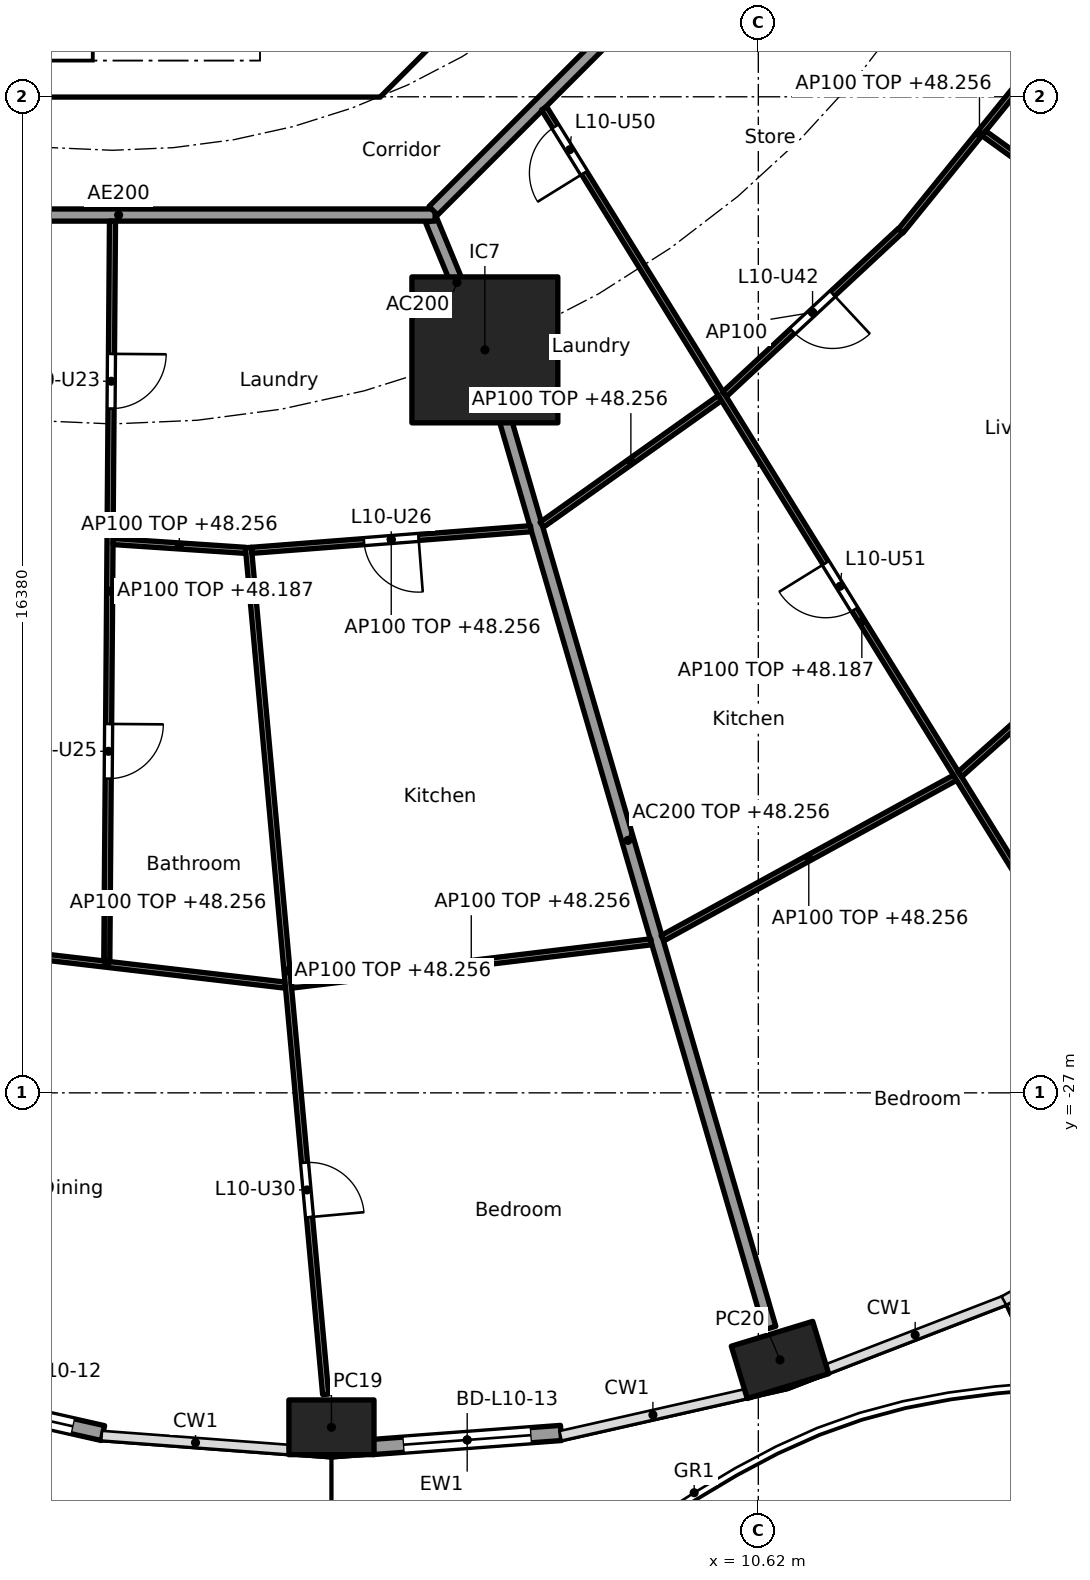
"""IFC4 building model, lengths in metres.
Left out: names, types, materials, properties, quantities, classifications, styles, units other than length and angle.
Written with IfcOpenShell. Run it as: python <this file> out.ifc"""

import sys

from ifc_helpers import new_model, si_unit, direction, frame, frame_2d, origin, origin_2d, place, context, subcontext, project, spatial, polyline, rectangle, hollow_rectangle, outline, extrude, element, fill, save


model = new_model("IFC4")
c1 = context("Model", 3, precision=1e-05, world=origin(), true_north=direction((0.0, 1.0)))
c2 = subcontext(c1, "Body", "Model", "MODEL_VIEW")
j1 = project(units=[si_unit("LENGTHUNIT", "METRE"), si_unit("PLANEANGLEUNIT", "RADIAN")], contexts=[c1])
p1 = place(None, origin())
s1 = spatial("IfcSite", under=j1, at=p1, CompositionType="ELEMENT")
p2 = place(p1, origin())
s2 = spatial("IfcBuilding", under=s1, at=p2, CompositionType="ELEMENT")
p3 = place(p2, frame((0.0, 0.0, 45.5)))
s3 = spatial("IfcBuildingStorey", under=s2, at=p3, CompositionType="ELEMENT", Elevation=45.5)
for number, where, z_axis, x_axis in (
    (1, (3.6, -32.5, 0.0), (0.0, 0.0, 1.0), (1.0, 0.0, 0.0)),
    (2, (10.976, -31.393, 0.0), (0.0, 0.0, 1.0), (0.957, 0.292, 0.0)),
):
    element("IfcColumn", number, at=place(p3, frame(where, z_axis=z_axis, x_axis=x_axis)), inside=s3, PredefinedType="COLUMN", context=c2, shape_type="SweptSolid", body=[
        extrude(hollow_rectangle(XDim=1.4, YDim=0.9, WallThickness=0.05, at=origin_2d()), origin(), (0.0, 0.0, 1.0), 3.7),
    ])
p4 = place(p3, frame((6.123, -14.782, 0.0), z_axis=(0.0, 0.0, 1.0), x_axis=(1.0, 0.0, 0.0)))
e3 = element("IfcColumn", 3, at=p4, inside=s3, PredefinedType="COLUMN", context=c2, shape_type="SweptSolid", body=[
    extrude(rectangle(XDim=2.4, YDim=2.4, at=origin_2d()), origin(), (0.0, 0.0, 1.0), 3.7),
])
p5 = place(p3, frame((-0.158, -32.596, 0.0), z_axis=(0.0, 0.0, 1.0), x_axis=(-0.975331134677, 0.220746863466, 0.0)))
e4 = element("IfcWall", 4, at=p5, inside=s3, PredefinedType="SOLIDWALL", context=c2, shape_type="SweptSolid", body=[
    extrude(rectangle(XDim=3.115, YDim=0.25, at=frame_2d((1.557, 0.0))), origin(), (0.0, 0.0, 1.0), 3.44),
])
p6 = place(p5, frame((0.507, 0.0, 0.0)))
e5 = element("IfcOpeningElement", 5, at=p6, cuts=e4, PredefinedType="OPENING", context=c2, shape_type="SweptSolid", body=[
    extrude(rectangle(XDim=2.1, YDim=2.4, at=frame_2d((1.05, 1.2))), frame((0.0, 0.135, 0.0), z_axis=(0.0, -1.0, 0.0), x_axis=(1.0, 0.0, 0.0)), (0.0, 0.0, 1.0), 0.27),
])
p7 = place(p3, frame((7.376, -32.593, 0.0), z_axis=(0.0, 0.0, 1.0), x_axis=(-0.997230834878, -0.074368420505, 0.0)))
e6 = element("IfcWall", 6, at=p7, inside=s3, PredefinedType="SOLIDWALL", context=c2, shape_type="SweptSolid", body=[
    extrude(rectangle(XDim=3.096, YDim=0.25, at=frame_2d((1.548, 0.0))), origin(), (0.0, 0.0, 1.0), 3.44),
])
p8 = place(p7, frame((0.498, 0.0, 0.0)))
e7 = element("IfcOpeningElement", 7, at=p8, cuts=e6, PredefinedType="OPENING", context=c2, shape_type="SweptSolid", body=[
    extrude(rectangle(XDim=2.1, YDim=2.4, at=frame_2d((1.05, 1.2))), frame((0.0, 0.135, 0.0), z_axis=(0.0, -1.0, 0.0), x_axis=(1.0, 0.0, 0.0)), (0.0, 0.0, 1.0), 0.27),
])
p9 = place(p3, frame((4.613, -9.988, 0.0), z_axis=(0.0, 0.0, 1.0), x_axis=(0.707106781187, 0.707106781187, 0.0)))
e8 = element("IfcWall", 8, at=p9, inside=s3, PredefinedType="SHEAR", context=c2, shape_type="SweptSolid", body=[
    extrude(rectangle(XDim=7.602, YDim=0.6, at=frame_2d((3.801, 0.0))), origin(), (0.0, 0.0, 1.0), 3.44),
])
p10 = place(p9, frame((3.201, 0.0, 0.0)))
e9 = element("IfcOpeningElement", 9, at=p10, cuts=e8, PredefinedType="OPENING", context=c2, shape_type="SweptSolid", body=[
    extrude(rectangle(XDim=1.2, YDim=2.1, at=frame_2d((0.6, 1.05))), frame((0.0, 0.31, 0.0), z_axis=(0.0, -1.0, 0.0), x_axis=(1.0, 0.0, 0.0)), (0.0, 0.0, 1.0), 0.62),
])
p11 = place(p3, frame((4.0, -10.025, 0.0), z_axis=(0.0, 0.0, 1.0), x_axis=(0.0, 1.0, 0.0)))
e10 = element("IfcWall", 10, at=p11, inside=s3, PredefinedType="SOLIDWALL", context=c2, shape_type="SweptSolid", body=[
    extrude(rectangle(XDim=3.0, YDim=0.2, at=frame_2d((1.5, 0.0))), origin(), (0.0, 0.0, 1.0), 3.44),
])
p12 = place(p11, frame((0.975, 0.0, 0.0)))
e11 = element("IfcOpeningElement", 11, at=p12, cuts=e10, PredefinedType="OPENING", context=c2, shape_type="SweptSolid", body=[
    extrude(rectangle(XDim=1.1, YDim=2.1, at=frame_2d((0.55, 1.05))), frame((0.0, 0.11, 0.0), z_axis=(0.0, -1.0, 0.0), x_axis=(1.0, 0.0, 0.0)), (0.0, 0.0, 1.0), 0.22),
])
p13 = place(p3, origin())
e12 = element("IfcWall", 12, at=p13, inside=s3, PredefinedType="SHEAR", context=c2, shape_type="SweptSolid", body=[
    extrude(outline(polyline([(-4.152, -10.025), (4.152, -10.025), (4.401, -9.776), (4.825, -10.2), (4.401, -10.625), (-4.401, -10.625), (-4.825, -10.2), (-4.401, -9.776), (-4.152, -10.025)])), origin(), (0.0, 0.0, 1.0), 3.44),
])
p14 = place(p3, frame((5.243, -12.657, 0.0), z_axis=(0.0, 0.0, 1.0), x_axis=(0.382707856524, -0.923869415315, 0.0)))
e13 = element("IfcWall", 13, at=p14, inside=s3, PredefinedType="PARTITIONING", context=c2, shape_type="SweptSolid", body=[
    extrude(rectangle(XDim=2.2, YDim=0.2, at=frame_2d((1.1, 0.0))), origin(), (0.0, 0.0, 1.0), 3.44),
])
p15 = place(p3, frame((6.137, -14.83, 0.0), z_axis=(0.0, 0.0, 1.0), x_axis=(0.27985745069, -0.960041565399, 0.0)))
e14 = element("IfcWall", 14, at=p15, inside=s3, PredefinedType="PARTITIONING", context=c2, shape_type="SweptSolid", body=[
    extrude(rectangle(XDim=16.705, YDim=0.2, at=frame_2d((8.353, 0.0))), origin(), (0.0, 0.0, 1.0), 2.756),
])
p16 = place(p3, frame((-5.104, -12.565, 0.0), z_axis=(0.0, 0.0, 1.0), x_axis=(1.0, 0.0, 0.0)))
e15 = element("IfcWall", 15, at=p16, inside=s3, PredefinedType="PARTITIONING", context=c2, shape_type="SweptSolid", body=[
    extrude(rectangle(XDim=10.409, YDim=0.2, at=frame_2d((5.205, 0.0))), origin(), (0.0, 0.0, 1.0), 3.44),
])
p17 = place(p16, frame((2.87, 0.0, 0.0)))
e16 = element("IfcOpeningElement", 16, at=p17, cuts=e15, PredefinedType="OPENING", context=c2, shape_type="SweptSolid", body=[
    extrude(rectangle(XDim=1.0, YDim=2.1, at=frame_2d((0.5, 1.05))), frame((0.0, 0.11, 0.0), z_axis=(0.0, -1.0, 0.0), x_axis=(1.0, 0.0, 0.0)), (0.0, 0.0, 1.0), 0.22),
])
p18 = place(p3, frame((5.275, -12.494, 0.0), z_axis=(0.0, 0.0, 1.0), x_axis=(0.707106781187, 0.707106781187, 0.0)))
e17 = element("IfcWall", 17, at=p18, inside=s3, PredefinedType="PARTITIONING", context=c2, shape_type="SweptSolid", body=[
    extrude(rectangle(XDim=10.409, YDim=0.2, at=frame_2d((5.205, 0.0))), origin(), (0.0, 0.0, 1.0), 3.44),
])
p19 = place(p18, frame((8.508, 0.0, 0.0)))
e18 = element("IfcOpeningElement", 18, at=p19, cuts=e17, PredefinedType="OPENING", context=c2, shape_type="SweptSolid", body=[
    extrude(rectangle(XDim=1.0, YDim=2.1, at=frame_2d((0.5, 1.05))), frame((0.0, 0.11, 0.0), z_axis=(0.0, -1.0, 0.0), x_axis=(1.0, 0.0, 0.0)), (0.0, 0.0, 1.0), 0.22),
])
p20 = place(p3, frame((-3.031, -24.543, 0.0), z_axis=(0.0, 0.0, 1.0), x_axis=(0.993255612046, -0.115945198862, 0.0)))
e19 = element("IfcWall", 19, at=p20, inside=s3, PredefinedType="PARTITIONING", context=c2, shape_type="SweptSolid", body=[
    extrude(rectangle(XDim=5.913, YDim=0.1, at=frame_2d((2.956, 0.0))), origin(), (0.0, 0.0, 1.0), 2.756),
])
p21 = place(p3, frame((-0.001, -12.665, 0.0), z_axis=(0.0, 0.0, 1.0), x_axis=(-0.007702417287, -0.999970335944, 0.0)))
e20 = element("IfcWall", 20, at=p21, inside=s3, PredefinedType="PARTITIONING", context=c2, shape_type="SweptSolid", body=[
    extrude(rectangle(XDim=12.171, YDim=0.1, at=frame_2d((6.086, 0.0))), origin(), (0.0, 0.0, 1.0), 2.687),
])
p22 = place(p21, frame((2.183, 0.0, 0.0)))
e21 = element("IfcOpeningElement", 21, at=p22, cuts=e20, PredefinedType="OPENING", context=c2, shape_type="SweptSolid", body=[
    extrude(rectangle(XDim=0.9, YDim=2.1, at=frame_2d((0.45, 1.05))), frame((0.0, 0.06, 0.0), z_axis=(0.0, -1.0, 0.0), x_axis=(1.0, 0.0, 0.0)), (0.0, 0.0, 1.0), 0.12),
])
p23 = place(p21, frame((8.269, 0.0, 0.0)))
e22 = element("IfcOpeningElement", 22, at=p23, cuts=e20, PredefinedType="OPENING", context=c2, shape_type="SweptSolid", body=[
    extrude(rectangle(XDim=0.9, YDim=2.1, at=frame_2d((0.45, 1.05))), frame((0.0, 0.06, 0.0), z_axis=(0.0, -1.0, 0.0), x_axis=(1.0, 0.0, 0.0)), (0.0, 0.0, 1.0), 0.12),
])
p24 = place(p3, frame((0.009, -17.934, 0.0), z_axis=(0.0, 0.0, 1.0), x_axis=(0.997794542617, -0.066378089183, 0.0)))
e23 = element("IfcWall", 23, at=p24, inside=s3, PredefinedType="PARTITIONING", context=c2, shape_type="SweptSolid", body=[
    extrude(rectangle(XDim=2.185, YDim=0.1, at=frame_2d((1.092, 0.0))), origin(), (0.0, 0.0, 1.0), 2.756),
])
p25 = place(p3, frame((2.234, -18.032, 0.0), z_axis=(0.0, 0.0, 1.0), x_axis=(0.090891502968, -0.995860800859, 0.0)))
e24 = element("IfcWall", 24, at=p25, inside=s3, PredefinedType="PARTITIONING", context=c2, shape_type="SweptSolid", body=[
    extrude(rectangle(XDim=13.984, YDim=0.1, at=frame_2d((6.992, 0.0))), origin(), (0.0, 0.0, 1.0), 2.756),
])
p26 = place(p25, frame((10.158, 0.0, 0.0)))
e25 = element("IfcOpeningElement", 25, at=p26, cuts=e24, PredefinedType="OPENING", context=c2, shape_type="SweptSolid", body=[
    extrude(rectangle(XDim=0.9, YDim=2.1, at=frame_2d((0.45, 1.05))), frame((0.0, 0.06, 0.0), z_axis=(0.0, -1.0, 0.0), x_axis=(1.0, 0.0, 0.0)), (0.0, 0.0, 1.0), 0.12),
])
p27 = place(p3, frame((2.288, -18.078, 0.0), z_axis=(0.0, 0.0, 1.0), x_axis=(0.99701850123, 0.077162868047, 0.0)))
e26 = element("IfcWall", 26, at=p27, inside=s3, PredefinedType="PARTITIONING", context=c2, shape_type="SweptSolid", body=[
    extrude(rectangle(XDim=4.604, YDim=0.1, at=frame_2d((2.302, 0.0))), origin(), (0.0, 0.0, 1.0), 2.756),
])
p28 = place(p27, frame((1.852, 0.0, 0.0)))
e27 = element("IfcOpeningElement", 27, at=p28, cuts=e26, PredefinedType="OPENING", context=c2, shape_type="SweptSolid", body=[
    extrude(rectangle(XDim=0.9, YDim=2.1, at=frame_2d((0.45, 1.05))), frame((0.0, 0.06, 0.0), z_axis=(0.0, -1.0, 0.0), x_axis=(1.0, 0.0, 0.0)), (0.0, 0.0, 1.0), 0.12),
])
p29 = place(p3, frame((2.941, -25.229, 0.0), z_axis=(0.0, 0.0, 1.0), x_axis=(0.992834127896, 0.119500604542, 0.0)))
e28 = element("IfcWall", 28, at=p29, inside=s3, PredefinedType="PARTITIONING", context=c2, shape_type="SweptSolid", body=[
    extrude(rectangle(XDim=5.959, YDim=0.1, at=frame_2d((2.98, 0.0))), origin(), (0.0, 0.0, 1.0), 2.756),
])
p30 = place(p3, frame((7.06, -17.657, 0.0), z_axis=(0.0, 0.0, 1.0), x_axis=(0.81492039338, 0.57957290521, 0.0)))
e29 = element("IfcWall", 29, at=p30, inside=s3, PredefinedType="PARTITIONING", context=c2, shape_type="SweptSolid", body=[
    extrude(rectangle(XDim=3.594, YDim=0.1, at=frame_2d((1.797, 0.0))), origin(), (0.0, 0.0, 1.0), 2.756),
])
p31 = place(p3, frame((9.045, -24.456, 0.0), z_axis=(0.0, 0.0, 1.0), x_axis=(0.876809987787, 0.480837025734, 0.0)))
e30 = element("IfcWall", 30, at=p31, inside=s3, PredefinedType="PARTITIONING", context=c2, shape_type="SweptSolid", body=[
    extrude(rectangle(XDim=5.486, YDim=0.1, at=frame_2d((2.743, 0.0))), origin(), (0.0, 0.0, 1.0), 2.756),
])
p32 = place(p3, frame((7.097, -10.81, 0.0), z_axis=(0.0, 0.0, 1.0), x_axis=(0.526453266471, -0.850204068576, 0.0)))
e31 = element("IfcWall", 31, at=p32, inside=s3, PredefinedType="PARTITIONING", context=c2, shape_type="SweptSolid", body=[
    extrude(rectangle(XDim=19.85, YDim=0.1, at=frame_2d((9.925, 0.0))), origin(), (0.0, 0.0, 1.0), 2.687),
])
p33 = place(p32, frame((0.35, 0.0, 0.0)))
e32 = element("IfcOpeningElement", 32, at=p33, cuts=e31, PredefinedType="OPENING", context=c2, shape_type="SweptSolid", body=[
    extrude(rectangle(XDim=0.9, YDim=2.1, at=frame_2d((0.45, 1.05))), frame((0.0, 0.06, 0.0), z_axis=(0.0, -1.0, 0.0), x_axis=(1.0, 0.0, 0.0)), (0.0, 0.0, 1.0), 0.12),
])
p34 = place(p32, frame((8.795, 0.0, 0.0)))
e33 = element("IfcOpeningElement", 33, at=p34, cuts=e31, PredefinedType="OPENING", context=c2, shape_type="SweptSolid", body=[
    extrude(rectangle(XDim=0.9, YDim=2.1, at=frame_2d((0.45, 1.05))), frame((0.0, 0.06, 0.0), z_axis=(0.0, -1.0, 0.0), x_axis=(1.0, 0.0, 0.0)), (0.0, 0.0, 1.0), 0.12),
])
p35 = place(p32, frame((15.935, 0.0, 0.0)))
e34 = element("IfcOpeningElement", 34, at=p35, cuts=e31, PredefinedType="OPENING", context=c2, shape_type="SweptSolid", body=[
    extrude(rectangle(XDim=0.9, YDim=2.1, at=frame_2d((0.45, 1.05))), frame((0.0, 0.06, 0.0), z_axis=(0.0, -1.0, 0.0), x_axis=(1.0, 0.0, 0.0)), (0.0, 0.0, 1.0), 0.12),
])
p36 = place(p3, frame((10.066, -15.511, 0.0), z_axis=(0.0, 0.0, 1.0), x_axis=(0.732022571638, 0.681280378855, 0.0)))
e35 = element("IfcWall", 35, at=p36, inside=s3, PredefinedType="PARTITIONING", context=c2, shape_type="SweptSolid", body=[
    extrude(rectangle(XDim=3.95, YDim=0.1, at=frame_2d((1.975, 0.0))), origin(), (0.0, 0.0, 1.0), 3.44),
])
p37 = place(p36, frame((1.525, 0.0, 0.0)))
e36 = element("IfcOpeningElement", 36, at=p37, cuts=e35, PredefinedType="OPENING", context=c2, shape_type="SweptSolid", body=[
    extrude(rectangle(XDim=0.9, YDim=2.1, at=frame_2d((0.45, 1.05))), frame((0.0, 0.06, 0.0), z_axis=(0.0, -1.0, 0.0), x_axis=(1.0, 0.0, 0.0)), (0.0, 0.0, 1.0), 0.12),
])
p38 = place(p3, frame((13.936, -21.761, 0.0), z_axis=(0.0, 0.0, 1.0), x_axis=(0.745806142791, 0.666163041136, 0.0)))
e37 = element("IfcWall", 37, at=p38, inside=s3, PredefinedType="PARTITIONING", context=c2, shape_type="SweptSolid", body=[
    extrude(rectangle(XDim=5.831, YDim=0.1, at=frame_2d((2.915, 0.0))), origin(), (0.0, 0.0, 1.0), 2.756),
])
p39 = place(p38, frame((2.465, 0.0, 0.0)))
e38 = element("IfcOpeningElement", 38, at=p39, cuts=e37, PredefinedType="OPENING", context=c2, shape_type="SweptSolid", body=[
    extrude(rectangle(XDim=0.9, YDim=2.1, at=frame_2d((0.45, 1.05))), frame((0.0, 0.06, 0.0), z_axis=(0.0, -1.0, 0.0), x_axis=(1.0, 0.0, 0.0)), (0.0, 0.0, 1.0), 0.12),
])
p40 = place(p3, frame((12.963, -12.825, 0.0), z_axis=(0.0, 0.0, 1.0), x_axis=(0.63012473344, 0.776493928056, 0.0)))
e39 = element("IfcWall", 39, at=p40, inside=s3, PredefinedType="PARTITIONING", context=c2, shape_type="SweptSolid", body=[
    extrude(rectangle(XDim=4.106, YDim=0.1, at=frame_2d((2.053, 0.0))), origin(), (0.0, 0.0, 1.0), 2.756),
])
p41 = place(p3, frame((14.329, -11.221, 0.0), z_axis=(0.0, 0.0, 1.0), x_axis=(0.810671130917, -0.58550176558, 0.0)))
e40 = element("IfcWall", 40, at=p41, inside=s3, PredefinedType="PARTITIONING", context=c2, shape_type="SweptSolid", body=[
    extrude(rectangle(XDim=15.106, YDim=0.1, at=frame_2d((7.553, 0.0))), origin(), (0.0, 0.0, 1.0), 2.837),
])
p42 = place(p41, frame((10.659, 0.0, 0.0)))
e41 = element("IfcOpeningElement", 41, at=p42, cuts=e40, PredefinedType="OPENING", context=c2, shape_type="SweptSolid", body=[
    extrude(rectangle(XDim=0.9, YDim=2.1, at=frame_2d((0.45, 1.05))), frame((0.0, 0.06, 0.0), z_axis=(0.0, -1.0, 0.0), x_axis=(1.0, 0.0, 0.0)), (0.0, 0.0, 1.0), 0.12),
])
p43 = place(p3, frame((10.813, -7.091, 0.0), z_axis=(0.0, 0.0, 1.0), x_axis=(0.885182649479, -0.465243674928, 0.0)))
e42 = element("IfcWall", 42, at=p43, inside=s3, PredefinedType="PARTITIONING", context=c2, shape_type="SweptSolid", body=[
    extrude(rectangle(XDim=12.551, YDim=0.1, at=frame_2d((6.275, 0.0))), origin(), (0.0, 0.0, 1.0), 2.687),
])
p44 = place(p43, frame((0.539, 0.0, 0.0)))
e43 = element("IfcOpeningElement", 43, at=p44, cuts=e42, PredefinedType="OPENING", context=c2, shape_type="SweptSolid", body=[
    extrude(rectangle(XDim=0.9, YDim=2.1, at=frame_2d((0.45, 1.05))), frame((0.0, 0.06, 0.0), z_axis=(0.0, -1.0, 0.0), x_axis=(1.0, 0.0, 0.0)), (0.0, 0.0, 1.0), 0.12),
])
p45 = place(p43, frame((8.494, 0.0, 0.0)))
e44 = element("IfcOpeningElement", 44, at=p45, cuts=e42, PredefinedType="OPENING", context=c2, shape_type="SweptSolid", body=[
    extrude(rectangle(XDim=0.9, YDim=2.1, at=frame_2d((0.45, 1.05))), frame((0.0, 0.06, 0.0), z_axis=(0.0, -1.0, 0.0), x_axis=(1.0, 0.0, 0.0)), (0.0, 0.0, 1.0), 0.12),
])
p46 = place(p6, origin())
e45 = element("IfcDoor", 45, at=p46, inside=s3, OperationType="SLIDING_TO_LEFT", PredefinedType="DOOR", context=c2, shape_type="SweptSolid", body=[
    extrude(rectangle(XDim=2.1, YDim=2.4, at=frame_2d((1.05, 1.2))), frame((0.0, 0.025, 0.0), z_axis=(0.0, -1.0, 0.0), x_axis=(1.0, 0.0, 0.0)), (0.0, 0.0, 1.0), 0.05),
])
fill(e5, e45)
p47 = place(p8, origin())
e46 = element("IfcDoor", 46, at=p47, inside=s3, OperationType="SLIDING_TO_LEFT", PredefinedType="DOOR", context=c2, shape_type="SweptSolid", body=[
    extrude(rectangle(XDim=2.1, YDim=2.4, at=frame_2d((1.05, 1.2))), frame((0.0, 0.025, 0.0), z_axis=(0.0, -1.0, 0.0), x_axis=(1.0, 0.0, 0.0)), (0.0, 0.0, 1.0), 0.05),
])
fill(e7, e46)
p48 = place(p22, origin())
e47 = element("IfcDoor", 47, at=p48, inside=s3, OperationType="SINGLE_SWING_LEFT", PredefinedType="DOOR", context=c2, shape_type="SweptSolid", body=[
    extrude(rectangle(XDim=0.9, YDim=2.1, at=frame_2d((0.45, 1.05))), frame((0.0, 0.025, 0.0), z_axis=(0.0, -1.0, 0.0), x_axis=(1.0, 0.0, 0.0)), (0.0, 0.0, 1.0), 0.05),
])
fill(e21, e47)
p49 = place(p23, origin())
e48 = element("IfcDoor", 48, at=p49, inside=s3, OperationType="SINGLE_SWING_LEFT", PredefinedType="DOOR", context=c2, shape_type="SweptSolid", body=[
    extrude(rectangle(XDim=0.9, YDim=2.1, at=frame_2d((0.45, 1.05))), frame((0.0, 0.025, 0.0), z_axis=(0.0, -1.0, 0.0), x_axis=(1.0, 0.0, 0.0)), (0.0, 0.0, 1.0), 0.05),
])
fill(e22, e48)
p50 = place(p28, frame((0.9, 0.0, 0.0), x_axis=(-1.0, 0.0, 0.0)))
e49 = element("IfcDoor", 49, at=p50, inside=s3, OperationType="SINGLE_SWING_LEFT", PredefinedType="DOOR", context=c2, shape_type="SweptSolid", body=[
    extrude(rectangle(XDim=0.9, YDim=2.1, at=frame_2d((0.45, 1.05))), frame((0.0, 0.025, 0.0), z_axis=(0.0, -1.0, 0.0), x_axis=(1.0, 0.0, 0.0)), (0.0, 0.0, 1.0), 0.05),
])
fill(e27, e49)
p51 = place(p26, origin())
e50 = element("IfcDoor", 50, at=p51, inside=s3, OperationType="SINGLE_SWING_RIGHT", PredefinedType="DOOR", context=c2, shape_type="SweptSolid", body=[
    extrude(rectangle(XDim=0.9, YDim=2.1, at=frame_2d((0.45, 1.05))), frame((0.0, 0.025, 0.0), z_axis=(0.0, -1.0, 0.0), x_axis=(1.0, 0.0, 0.0)), (0.0, 0.0, 1.0), 0.05),
])
fill(e25, e50)
p52 = place(p37, frame((0.9, 0.0, 0.0), x_axis=(-1.0, 0.0, 0.0)))
e51 = element("IfcDoor", 51, at=p52, inside=s3, OperationType="SINGLE_SWING_LEFT", PredefinedType="DOOR", context=c2, shape_type="SweptSolid", body=[
    extrude(rectangle(XDim=0.9, YDim=2.1, at=frame_2d((0.45, 1.05))), frame((0.0, 0.025, 0.0), z_axis=(0.0, -1.0, 0.0), x_axis=(1.0, 0.0, 0.0)), (0.0, 0.0, 1.0), 0.05),
])
fill(e36, e51)
p53 = place(p33, frame((0.9, 0.0, 0.0), x_axis=(-1.0, 0.0, 0.0)))
e52 = element("IfcDoor", 52, at=p53, inside=s3, OperationType="SINGLE_SWING_LEFT", PredefinedType="DOOR", context=c2, shape_type="SweptSolid", body=[
    extrude(rectangle(XDim=0.9, YDim=2.1, at=frame_2d((0.45, 1.05))), frame((0.0, 0.025, 0.0), z_axis=(0.0, -1.0, 0.0), x_axis=(1.0, 0.0, 0.0)), (0.0, 0.0, 1.0), 0.05),
])
fill(e32, e52)
p54 = place(p34, frame((0.9, 0.0, 0.0), x_axis=(-1.0, 0.0, 0.0)))
e53 = element("IfcDoor", 53, at=p54, inside=s3, OperationType="SINGLE_SWING_RIGHT", PredefinedType="DOOR", context=c2, shape_type="SweptSolid", body=[
    extrude(rectangle(XDim=0.9, YDim=2.1, at=frame_2d((0.45, 1.05))), frame((0.0, 0.025, 0.0), z_axis=(0.0, -1.0, 0.0), x_axis=(1.0, 0.0, 0.0)), (0.0, 0.0, 1.0), 0.05),
])
fill(e33, e53)
save(model, sys.argv[1])
